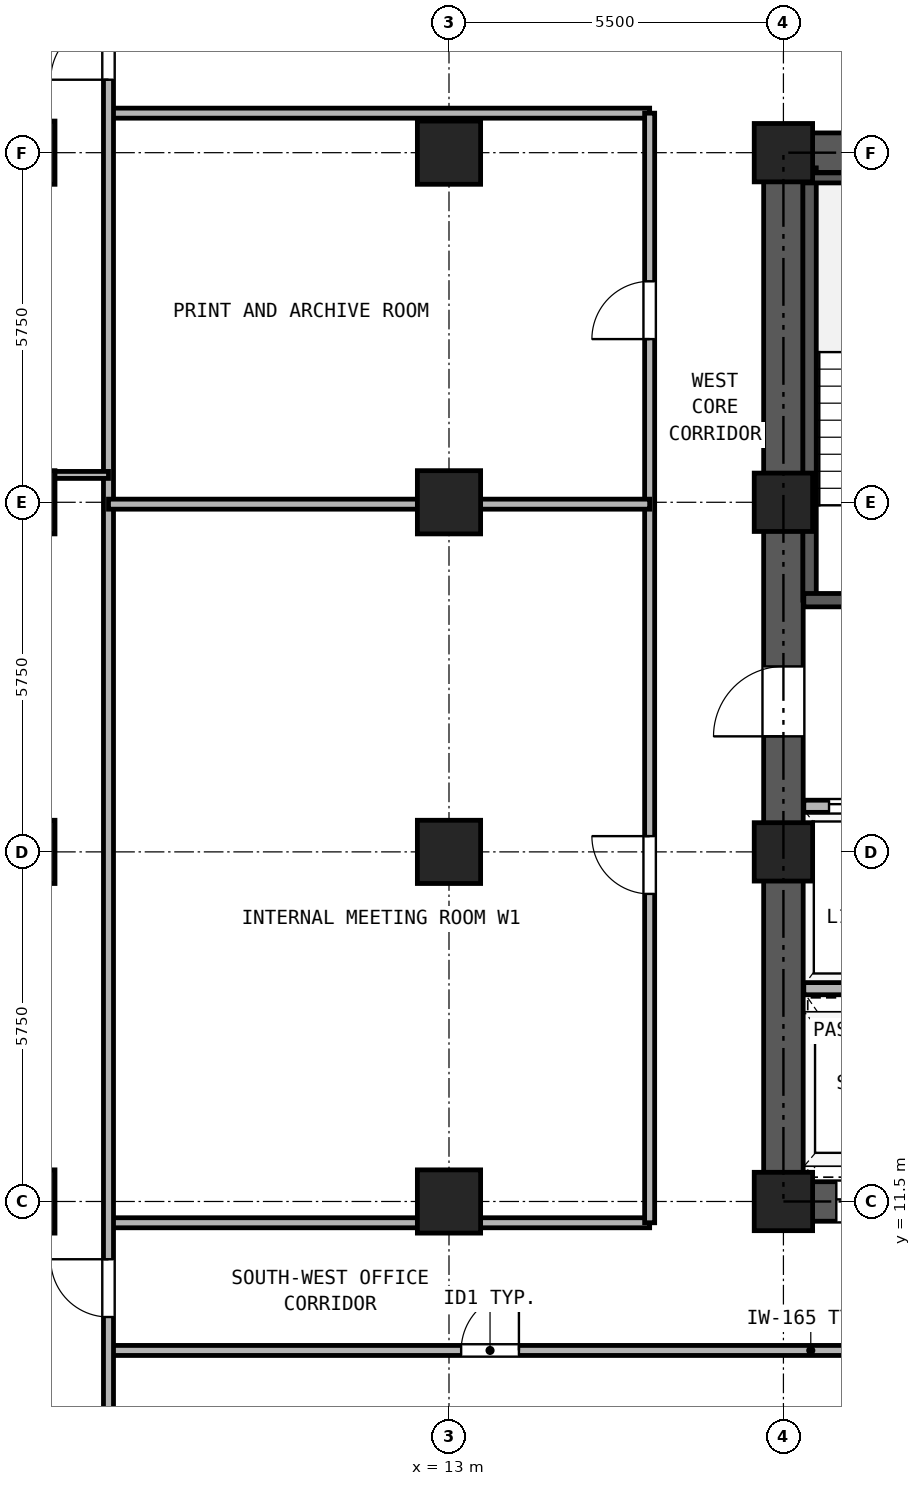
"""IFC4 building model, lengths in metres.
Left out: names, types, materials, properties, quantities, classifications, styles, units other than length and angle.
Written with IfcOpenShell. Run it as: python <this file> out.ifc"""

import sys

from ifc_helpers import new_model, si_unit, direction, frame, frame_2d, origin, origin_2d, place, context, subcontext, project, spatial, rectangle, hollow_rectangle, extrude, source, transform, mapped, element, fill, save


model = new_model("IFC4")
c1 = context("Model", 3, precision=1e-05, world=origin(), true_north=direction((0.0, 1.0)))
c2 = subcontext(c1, "Body", "Model", "MODEL_VIEW")
j1 = project(units=[si_unit("LENGTHUNIT", "METRE"), si_unit("PLANEANGLEUNIT", "RADIAN")], contexts=[c1])
p1 = place(None, origin())
s1 = spatial("IfcSite", under=j1, at=p1, CompositionType="ELEMENT")
p2 = place(p1, origin())
s2 = spatial("IfcBuilding", under=s1, at=p2, CompositionType="ELEMENT")
p3 = place(p2, frame((0.0, 0.0, 40.5)))
s3 = spatial("IfcBuildingStorey", under=s2, at=p3, CompositionType="ELEMENT", Elevation=40.5)
m1 = source(origin(), c2, "Body", "SweptSolid", [
    extrude(hollow_rectangle(XDim=1.04, YDim=1.04, WallThickness=0.065, at=origin_2d()), origin(), (0.0, 0.0, 1.0), 3.32),
])
for number, where, z_axis, x_axis in (
    (1, (6.0, 11.5, 0.0), (0.0, 0.0, 1.0), (1.0, 0.0, 0.0)),
    (2, (6.0, 17.25, 0.0), (0.0, 0.0, 1.0), (1.0, 0.0, 0.0)),
    (3, (6.0, 23.0, 0.0), (0.0, 0.0, 1.0), (1.0, 0.0, 0.0)),
    (4, (6.0, 28.75, 0.0), (0.0, 0.0, 1.0), (1.0, 0.0, 0.0)),
    (5, (13.0, 11.5, 0.0), (0.0, 0.0, 1.0), (1.0, 0.0, 0.0)),
    (6, (13.0, 17.25, 0.0), (0.0, 0.0, 1.0), (1.0, 0.0, 0.0)),
    (7, (13.0, 23.0, 0.0), (0.0, 0.0, 1.0), (1.0, 0.0, 0.0)),
    (8, (13.0, 28.75, 0.0), (0.0, 0.0, 1.0), (1.0, 0.0, 0.0)),
):
    element("IfcColumn", number, at=place(p3, frame(where, z_axis=z_axis, x_axis=x_axis)), inside=s3, PredefinedType="COLUMN", context=c2, shape_type="MappedRepresentation", body=[
        mapped(m1, transform((0.0, 0.0, 0.0), x_axis=(1.0, 0.0, 0.0), y_axis=(0.0, 1.0, 0.0), z_axis=(0.0, 0.0, 1.0), scale=1.0)),
    ])
m2 = source(origin(), c2, "Body", "SweptSolid", [
    extrude(hollow_rectangle(XDim=0.96, YDim=0.96, WallThickness=0.06, at=origin_2d()), origin(), (0.0, 0.0, 1.0), 3.32),
])
for number, where, z_axis, x_axis in (
    (9, (18.5, 11.5, 0.0), (0.0, 0.0, 1.0), (1.0, 0.0, 0.0)),
    (10, (18.5, 17.25, 0.0), (0.0, 0.0, 1.0), (1.0, 0.0, 0.0)),
    (11, (18.5, 23.0, 0.0), (0.0, 0.0, 1.0), (1.0, 0.0, 0.0)),
    (12, (18.5, 28.75, 0.0), (0.0, 0.0, 1.0), (1.0, 0.0, 0.0)),
):
    element("IfcColumn", number, at=place(p3, frame(where, z_axis=z_axis, x_axis=x_axis)), inside=s3, PredefinedType="COLUMN", context=c2, shape_type="MappedRepresentation", body=[
        mapped(m2, transform((0.0, 0.0, 0.0), x_axis=(1.0, 0.0, 0.0), y_axis=(0.0, 1.0, 0.0), z_axis=(0.0, 0.0, 1.0), scale=1.0)),
    ])
p4 = place(p3, frame((18.175, 11.5, 0.0), z_axis=(0.0, 0.0, 1.0), x_axis=(1.0, 0.0, 0.0)))
e13 = element("IfcWall", 13, at=p4, inside=s3, PredefinedType="SHEAR", context=c2, shape_type="SweptSolid", body=[
    extrude(rectangle(XDim=10.65, YDim=0.65, at=frame_2d((5.325, 0.0))), origin(), (0.0, 0.0, 1.0), 3.32),
])
p5 = place(p4, frame((1.195, 0.0, 0.0)))
e14 = element("IfcOpeningElement", 14, at=p5, cuts=e13, PredefinedType="OPENING", context=c2, shape_type="SweptSolid", body=[
    extrude(rectangle(XDim=1.1, YDim=2.25, at=frame_2d((0.55, 1.125))), frame((0.0, 0.335, 0.0), z_axis=(0.0, -1.0, 0.0), x_axis=(1.0, 0.0, 0.0)), (0.0, 0.0, 1.0), 0.67),
])
p6 = place(p4, frame((3.495, 0.0, 0.0)))
e15 = element("IfcOpeningElement", 15, at=p6, cuts=e13, PredefinedType="OPENING", context=c2, shape_type="SweptSolid", body=[
    extrude(rectangle(XDim=1.1, YDim=2.25, at=frame_2d((0.55, 1.125))), frame((0.0, 0.335, 0.0), z_axis=(0.0, -1.0, 0.0), x_axis=(1.0, 0.0, 0.0)), (0.0, 0.0, 1.0), 0.67),
])
p7 = place(p4, frame((5.925, 0.0, 0.0)))
e16 = element("IfcOpeningElement", 16, at=p7, cuts=e13, PredefinedType="OPENING", context=c2, shape_type="SweptSolid", body=[
    extrude(rectangle(XDim=1.1, YDim=2.25, at=frame_2d((0.55, 1.125))), frame((0.0, 0.335, 0.0), z_axis=(0.0, -1.0, 0.0), x_axis=(1.0, 0.0, 0.0)), (0.0, 0.0, 1.0), 0.67),
])
p8 = place(p4, frame((8.325, 0.0, 0.0)))
e17 = element("IfcOpeningElement", 17, at=p8, cuts=e13, PredefinedType="OPENING", context=c2, shape_type="SweptSolid", body=[
    extrude(rectangle(XDim=1.1, YDim=2.25, at=frame_2d((0.55, 1.125))), frame((0.0, 0.335, 0.0), z_axis=(0.0, -1.0, 0.0), x_axis=(1.0, 0.0, 0.0)), (0.0, 0.0, 1.0), 0.67),
])
p9 = place(p3, frame((18.175, 28.75, 0.0), z_axis=(0.0, 0.0, 1.0), x_axis=(1.0, 0.0, 0.0)))
e18 = element("IfcWall", 18, at=p9, inside=s3, PredefinedType="SHEAR", context=c2, shape_type="SweptSolid", body=[
    extrude(rectangle(XDim=10.65, YDim=0.65, at=frame_2d((5.325, 0.0))), origin(), (0.0, 0.0, 1.0), 3.32),
])
p10 = place(p9, frame((4.205, 0.0, 0.0)))
e19 = element("IfcOpeningElement", 19, at=p10, cuts=e18, PredefinedType="OPENING", context=c2, shape_type="SweptSolid", body=[
    extrude(rectangle(XDim=0.9, YDim=2.05, at=frame_2d((0.45, 1.025))), frame((0.0, 0.335, 0.0), z_axis=(0.0, -1.0, 0.0), x_axis=(1.0, 0.0, 0.0)), (0.0, 0.0, 1.0), 0.67),
])
p11 = place(p9, frame((5.745, 0.0, 0.0)))
e20 = element("IfcOpeningElement", 20, at=p11, cuts=e18, PredefinedType="OPENING", context=c2, shape_type="SweptSolid", body=[
    extrude(rectangle(XDim=0.9, YDim=2.05, at=frame_2d((0.45, 1.025))), frame((0.0, 0.335, 0.0), z_axis=(0.0, -1.0, 0.0), x_axis=(1.0, 0.0, 0.0)), (0.0, 0.0, 1.0), 0.67),
])
p12 = place(p3, frame((18.5, 11.825, 0.0), z_axis=(0.0, 0.0, 1.0), x_axis=(0.0, 1.0, 0.0)))
e21 = element("IfcWall", 21, at=p12, inside=s3, PredefinedType="SHEAR", context=c2, shape_type="SweptSolid", body=[
    extrude(rectangle(XDim=16.6, YDim=0.65, at=frame_2d((8.3, 0.0))), origin(), (0.0, 0.0, 1.0), 3.32),
])
p13 = place(p12, frame((7.325, 0.0, 0.0)))
e22 = element("IfcOpeningElement", 22, at=p13, cuts=e21, PredefinedType="OPENING", context=c2, shape_type="SweptSolid", body=[
    extrude(rectangle(XDim=1.15, YDim=2.2, at=frame_2d((0.575, 1.1))), frame((0.0, 0.335, 0.0), z_axis=(0.0, -1.0, 0.0), x_axis=(1.0, 0.0, 0.0)), (0.0, 0.0, 1.0), 0.67),
])
p14 = place(p3, frame((18.93, 21.39, 0.0), z_axis=(0.0, 0.0, 1.0), x_axis=(0.0, 1.0, 0.0)))
e23 = element("IfcWall", 23, at=p14, inside=s3, PredefinedType="SOLIDWALL", context=c2, shape_type="SweptSolid", body=[
    extrude(rectangle(XDim=7.11, YDim=0.22, at=frame_2d((3.555, 0.0))), origin(), (0.0, 0.0, 1.0), 3.32),
])
p15 = place(p3, frame((18.835, 28.335, 0.0), z_axis=(0.0, 0.0, 1.0), x_axis=(1.0, 0.0, 0.0)))
e24 = element("IfcWall", 24, at=p15, inside=s3, PredefinedType="PARTITIONING", context=c2, shape_type="SweptSolid", body=[
    extrude(rectangle(XDim=3.275, YDim=0.165, at=frame_2d((1.638, 0.0))), origin(), (0.0, 0.0, 1.0), 3.32),
])
p16 = place(p3, frame((18.835, 21.39, 0.0), z_axis=(0.0, 0.0, 1.0), x_axis=(1.0, 0.0, 0.0)))
e25 = element("IfcWall", 25, at=p16, inside=s3, PredefinedType="SOLIDWALL", context=c2, shape_type="SweptSolid", body=[
    extrude(rectangle(XDim=6.295, YDim=0.22, at=frame_2d((3.147, 0.0))), origin(), (0.0, 0.0, 1.0), 3.32),
])
p17 = place(p16, frame((1.015, 0.0, 0.0)))
e26 = element("IfcOpeningElement", 26, at=p17, cuts=e25, PredefinedType="OPENING", context=c2, shape_type="SweptSolid", body=[
    extrude(rectangle(XDim=1.15, YDim=2.2, at=frame_2d((0.575, 1.1))), frame((0.0, 0.12, 0.0), z_axis=(0.0, -1.0, 0.0), x_axis=(1.0, 0.0, 0.0)), (0.0, 0.0, 1.0), 0.24),
])
p18 = place(p16, frame((4.745, 0.0, 0.0)))
e27 = element("IfcOpeningElement", 27, at=p18, cuts=e25, PredefinedType="OPENING", context=c2, shape_type="SweptSolid", body=[
    extrude(rectangle(XDim=1.1, YDim=2.25, at=frame_2d((0.55, 1.125))), frame((0.0, 0.12, 0.0), z_axis=(0.0, -1.0, 0.0), x_axis=(1.0, 0.0, 0.0)), (0.0, 0.0, 1.0), 0.24),
])
p19 = place(p3, frame((18.835, 18.0, 0.0), z_axis=(0.0, 0.0, 1.0), x_axis=(1.0, 0.0, 0.0)))
e28 = element("IfcWall", 28, at=p19, inside=s3, PredefinedType="PARTITIONING", context=c2, shape_type="SweptSolid", body=[
    extrude(rectangle(XDim=9.33, YDim=0.2, at=frame_2d((4.665, 0.0))), origin(), (0.0, 0.0, 1.0), 3.32),
])
p20 = place(p19, frame((0.415, 0.0, 0.0)))
e29 = element("IfcOpeningElement", 29, at=p20, cuts=e28, PredefinedType="OPENING", context=c2, shape_type="SweptSolid", body=[
    extrude(rectangle(XDim=1.3, YDim=2.3, at=frame_2d((0.65, 1.15))), frame((0.0, 0.11, 0.0), z_axis=(0.0, -1.0, 0.0), x_axis=(1.0, 0.0, 0.0)), (0.0, 0.0, 1.0), 0.22),
])
p21 = place(p19, frame((2.515, 0.0, 0.0)))
e30 = element("IfcOpeningElement", 30, at=p21, cuts=e28, PredefinedType="OPENING", context=c2, shape_type="SweptSolid", body=[
    extrude(rectangle(XDim=1.3, YDim=2.3, at=frame_2d((0.65, 1.15))), frame((0.0, 0.11, 0.0), z_axis=(0.0, -1.0, 0.0), x_axis=(1.0, 0.0, 0.0)), (0.0, 0.0, 1.0), 0.22),
])
p22 = place(p19, frame((7.015, 0.0, 0.0)))
e31 = element("IfcOpeningElement", 31, at=p22, cuts=e28, PredefinedType="OPENING", context=c2, shape_type="SweptSolid", body=[
    extrude(rectangle(XDim=1.0, YDim=2.15, at=frame_2d((0.5, 1.075))), frame((0.0, 0.11, 0.0), z_axis=(0.0, -1.0, 0.0), x_axis=(1.0, 0.0, 0.0)), (0.0, 0.0, 1.0), 0.22),
])
p23 = place(p3, frame((18.835, 15.0, 0.0), z_axis=(0.0, 0.0, 1.0), x_axis=(1.0, 0.0, 0.0)))
e32 = element("IfcWall", 32, at=p23, inside=s3, PredefinedType="PARTITIONING", context=c2, shape_type="SweptSolid", body=[
    extrude(rectangle(XDim=9.33, YDim=0.2, at=frame_2d((4.665, 0.0))), origin(), (0.0, 0.0, 1.0), 3.32),
])
p24 = place(p3, frame((7.4, 9.05, 0.0), z_axis=(0.0, 0.0, 1.0), x_axis=(1.0, 0.0, 0.0)))
e33 = element("IfcWall", 33, at=p24, inside=s3, PredefinedType="PARTITIONING", context=c2, shape_type="SweptSolid", body=[
    extrude(rectangle(XDim=32.2, YDim=0.165, at=frame_2d((16.1, 0.0))), origin(), (0.0, 0.0, 1.0), 3.32),
])
p25 = place(p24, frame((5.8, 0.0, 0.0)))
e34 = element("IfcOpeningElement", 34, at=p25, cuts=e33, PredefinedType="OPENING", context=c2, shape_type="SweptSolid", body=[
    extrude(rectangle(XDim=0.95, YDim=2.15, at=frame_2d((0.475, 1.075))), frame((0.0, 0.093, 0.0), z_axis=(0.0, -1.0, 0.0), x_axis=(1.0, 0.0, 0.0)), (0.0, 0.0, 1.0), 0.185),
])
p26 = place(p24, frame((16.35, 0.0, 0.0)))
e35 = element("IfcOpeningElement", 35, at=p26, cuts=e33, PredefinedType="OPENING", context=c2, shape_type="SweptSolid", body=[
    extrude(rectangle(XDim=0.95, YDim=2.15, at=frame_2d((0.475, 1.075))), frame((0.0, 0.093, 0.0), z_axis=(0.0, -1.0, 0.0), x_axis=(1.0, 0.0, 0.0)), (0.0, 0.0, 1.0), 0.185),
])
p27 = place(p24, frame((23.6, 0.0, 0.0)))
e36 = element("IfcOpeningElement", 36, at=p27, cuts=e33, PredefinedType="OPENING", context=c2, shape_type="SweptSolid", body=[
    extrude(rectangle(XDim=0.95, YDim=2.15, at=frame_2d((0.475, 1.075))), frame((0.0, 0.093, 0.0), z_axis=(0.0, -1.0, 0.0), x_axis=(1.0, 0.0, 0.0)), (0.0, 0.0, 1.0), 0.185),
])
p28 = place(p24, frame((27.95, 0.0, 0.0)))
e37 = element("IfcOpeningElement", 37, at=p28, cuts=e33, PredefinedType="OPENING", context=c2, shape_type="SweptSolid", body=[
    extrude(rectangle(XDim=0.92, YDim=2.1, at=frame_2d((0.46, 1.05))), frame((0.0, 0.093, 0.0), z_axis=(0.0, -1.0, 0.0), x_axis=(1.0, 0.0, 0.0)), (0.0, 0.0, 1.0), 0.185),
])
p29 = place(p24, frame((30.5, 0.0, 0.0)))
e38 = element("IfcOpeningElement", 38, at=p29, cuts=e33, PredefinedType="OPENING", context=c2, shape_type="SweptSolid", body=[
    extrude(rectangle(XDim=0.92, YDim=2.1, at=frame_2d((0.46, 1.05))), frame((0.0, 0.093, 0.0), z_axis=(0.0, -1.0, 0.0), x_axis=(1.0, 0.0, 0.0)), (0.0, 0.0, 1.0), 0.185),
])
for number, where, z_axis, x_axis in (
    (39, (7.4, 11.15, 0.0), (0.0, 0.0, 1.0), (1.0, 0.0, 0.0)),
    (40, (7.4, 29.4, 0.0), (0.0, 0.0, 1.0), (1.0, 0.0, 0.0)),
):
    element("IfcWall", number, at=place(p3, frame(where, z_axis=z_axis, x_axis=x_axis)), inside=s3, PredefinedType="PARTITIONING", context=c2, shape_type="SweptSolid", body=[
        extrude(rectangle(XDim=8.9, YDim=0.165, at=frame_2d((4.45, 0.0))), origin(), (0.0, 0.0, 1.0), 3.32),
    ])
p30 = place(p3, frame((16.3, 11.15, 0.0), z_axis=(0.0, 0.0, 1.0), x_axis=(0.0, 1.0, 0.0)))
e41 = element("IfcWall", 41, at=p30, inside=s3, PredefinedType="PARTITIONING", context=c2, shape_type="SweptSolid", body=[
    extrude(rectangle(XDim=18.25, YDim=0.165, at=frame_2d((9.125, 0.0))), origin(), (0.0, 0.0, 1.0), 3.32),
])
p31 = place(p30, frame((5.409, 0.0, 0.0)))
e42 = element("IfcOpeningElement", 42, at=p31, cuts=e41, PredefinedType="OPENING", context=c2, shape_type="SweptSolid", body=[
    extrude(rectangle(XDim=0.95, YDim=2.15, at=frame_2d((0.475, 1.075))), frame((0.0, 0.093, 0.0), z_axis=(0.0, -1.0, 0.0), x_axis=(1.0, 0.0, 0.0)), (0.0, 0.0, 1.0), 0.185),
])
p32 = place(p30, frame((14.534, 0.0, 0.0)))
e43 = element("IfcOpeningElement", 43, at=p32, cuts=e41, PredefinedType="OPENING", context=c2, shape_type="SweptSolid", body=[
    extrude(rectangle(XDim=0.95, YDim=2.15, at=frame_2d((0.475, 1.075))), frame((0.0, 0.093, 0.0), z_axis=(0.0, -1.0, 0.0), x_axis=(1.0, 0.0, 0.0)), (0.0, 0.0, 1.0), 0.185),
])
p33 = place(p3, frame((7.4, 0.16, 0.0), z_axis=(0.0, 0.0, 1.0), x_axis=(0.0, 1.0, 0.0)))
e44 = element("IfcWall", 44, at=p33, inside=s3, PredefinedType="PARTITIONING", context=c2, shape_type="SweptSolid", body=[
    extrude(rectangle(XDim=40.18, YDim=0.165, at=frame_2d((20.09, 0.0))), origin(), (0.0, 0.0, 1.0), 3.32),
])
p34 = place(p33, frame((9.44, 0.0, 0.0)))
e45 = element("IfcOpeningElement", 45, at=p34, cuts=e44, PredefinedType="OPENING", context=c2, shape_type="SweptSolid", body=[
    extrude(rectangle(XDim=0.95, YDim=2.15, at=frame_2d((0.475, 1.075))), frame((0.0, 0.093, 0.0), z_axis=(0.0, -1.0, 0.0), x_axis=(1.0, 0.0, 0.0)), (0.0, 0.0, 1.0), 0.185),
])
p35 = place(p33, frame((29.79, 0.0, 0.0)))
e46 = element("IfcOpeningElement", 46, at=p35, cuts=e44, PredefinedType="OPENING", context=c2, shape_type="SweptSolid", body=[
    extrude(rectangle(XDim=0.95, YDim=2.15, at=frame_2d((0.475, 1.075))), frame((0.0, 0.093, 0.0), z_axis=(0.0, -1.0, 0.0), x_axis=(1.0, 0.0, 0.0)), (0.0, 0.0, 1.0), 0.185),
])
p36 = place(p3, frame((0.16, 23.45, 0.0), z_axis=(0.0, 0.0, 1.0), x_axis=(1.0, 0.0, 0.0)))
e47 = element("IfcWall", 47, at=p36, inside=s3, PredefinedType="PARTITIONING", context=c2, shape_type="SweptSolid", body=[
    extrude(rectangle(XDim=7.24, YDim=0.115, at=frame_2d((3.62, 0.0))), origin(), (0.0, 0.0, 1.0), 3.32),
])
p37 = place(p3, frame((7.4, 22.969, 0.0), z_axis=(0.0, 0.0, 1.0), x_axis=(1.0, 0.0, 0.0)))
e48 = element("IfcWall", 48, at=p37, inside=s3, PredefinedType="PARTITIONING", context=c2, shape_type="SweptSolid", body=[
    extrude(rectangle(XDim=8.9, YDim=0.165, at=frame_2d((4.45, 0.0))), origin(), (0.0, 0.0, 1.0), 2.539),
])
p38 = place(p20, origin())
e49 = element("IfcDoor", 49, at=p38, inside=s3, OperationType="DOUBLE_DOOR_SLIDING", PredefinedType="DOOR", context=c2, shape_type="SweptSolid", body=[
    extrude(rectangle(XDim=1.3, YDim=2.3, at=frame_2d((0.65, 1.15))), frame((0.0, 0.025, 0.0), z_axis=(0.0, -1.0, 0.0), x_axis=(1.0, 0.0, 0.0)), (0.0, 0.0, 1.0), 0.05),
])
fill(e29, e49)
p39 = place(p13, frame((1.15, 0.0, 0.0), z_axis=(0.0, 0.0, 1.0), x_axis=(-1.0, 0.0, 0.0)))
e50 = element("IfcDoor", 50, at=p39, inside=s3, OperationType="SINGLE_SWING_LEFT", PredefinedType="DOOR", context=c2, shape_type="SweptSolid", body=[
    extrude(rectangle(XDim=1.15, YDim=2.2, at=frame_2d((0.575, 1.1))), frame((0.0, 0.025, 0.0), z_axis=(0.0, -1.0, 0.0), x_axis=(1.0, 0.0, 0.0)), (0.0, 0.0, 1.0), 0.05),
])
fill(e22, e50)
p40 = place(p5, frame((1.1, 0.0, 0.0), z_axis=(0.0, 0.0, 1.0), x_axis=(-1.0, 0.0, 0.0)))
e51 = element("IfcDoor", 51, at=p40, inside=s3, OperationType="DOUBLE_DOOR_SLIDING", PredefinedType="DOOR", context=c2, shape_type="SweptSolid", body=[
    extrude(rectangle(XDim=1.1, YDim=2.25, at=frame_2d((0.55, 1.125))), frame((0.0, 0.025, 0.0), z_axis=(0.0, -1.0, 0.0), x_axis=(1.0, 0.0, 0.0)), (0.0, 0.0, 1.0), 0.05),
])
fill(e14, e51)
p41 = place(p25, frame((0.95, 0.0, 0.0), z_axis=(0.0, 0.0, 1.0), x_axis=(-1.0, 0.0, 0.0)))
e52 = element("IfcDoor", 52, at=p41, inside=s3, OperationType="SINGLE_SWING_RIGHT", PredefinedType="DOOR", context=c2, shape_type="SweptSolid", body=[
    extrude(rectangle(XDim=0.95, YDim=2.15, at=frame_2d((0.475, 1.075))), frame((0.0, 0.025, 0.0), z_axis=(0.0, -1.0, 0.0), x_axis=(1.0, 0.0, 0.0)), (0.0, 0.0, 1.0), 0.05),
])
fill(e34, e52)
p42 = place(p34, frame((0.95, 0.0, 0.0), z_axis=(0.0, 0.0, 1.0), x_axis=(-1.0, 0.0, 0.0)))
e53 = element("IfcDoor", 53, at=p42, inside=s3, OperationType="SINGLE_SWING_RIGHT", PredefinedType="DOOR", context=c2, shape_type="SweptSolid", body=[
    extrude(rectangle(XDim=0.95, YDim=2.15, at=frame_2d((0.475, 1.075))), frame((0.0, 0.025, 0.0), z_axis=(0.0, -1.0, 0.0), x_axis=(1.0, 0.0, 0.0)), (0.0, 0.0, 1.0), 0.05),
])
fill(e45, e53)
p43 = place(p35, frame((0.95, 0.0, 0.0), z_axis=(0.0, 0.0, 1.0), x_axis=(-1.0, 0.0, 0.0)))
e54 = element("IfcDoor", 54, at=p43, inside=s3, OperationType="SINGLE_SWING_LEFT", PredefinedType="DOOR", context=c2, shape_type="SweptSolid", body=[
    extrude(rectangle(XDim=0.95, YDim=2.15, at=frame_2d((0.475, 1.075))), frame((0.0, 0.025, 0.0), z_axis=(0.0, -1.0, 0.0), x_axis=(1.0, 0.0, 0.0)), (0.0, 0.0, 1.0), 0.05),
])
fill(e46, e54)
p44 = place(p31, frame((0.95, 0.0, 0.0), z_axis=(0.0, 0.0, 1.0), x_axis=(-1.0, 0.0, 0.0)))
e55 = element("IfcDoor", 55, at=p44, inside=s3, OperationType="SINGLE_SWING_RIGHT", PredefinedType="DOOR", context=c2, shape_type="SweptSolid", body=[
    extrude(rectangle(XDim=0.95, YDim=2.15, at=frame_2d((0.475, 1.075))), frame((0.0, 0.025, 0.0), z_axis=(0.0, -1.0, 0.0), x_axis=(1.0, 0.0, 0.0)), (0.0, 0.0, 1.0), 0.05),
])
fill(e42, e55)
p45 = place(p32, frame((0.95, 0.0, 0.0), z_axis=(0.0, 0.0, 1.0), x_axis=(-1.0, 0.0, 0.0)))
e56 = element("IfcDoor", 56, at=p45, inside=s3, OperationType="SINGLE_SWING_LEFT", PredefinedType="DOOR", context=c2, shape_type="SweptSolid", body=[
    extrude(rectangle(XDim=0.95, YDim=2.15, at=frame_2d((0.475, 1.075))), frame((0.0, 0.025, 0.0), z_axis=(0.0, -1.0, 0.0), x_axis=(1.0, 0.0, 0.0)), (0.0, 0.0, 1.0), 0.05),
])
fill(e43, e56)
save(model, sys.argv[1])
